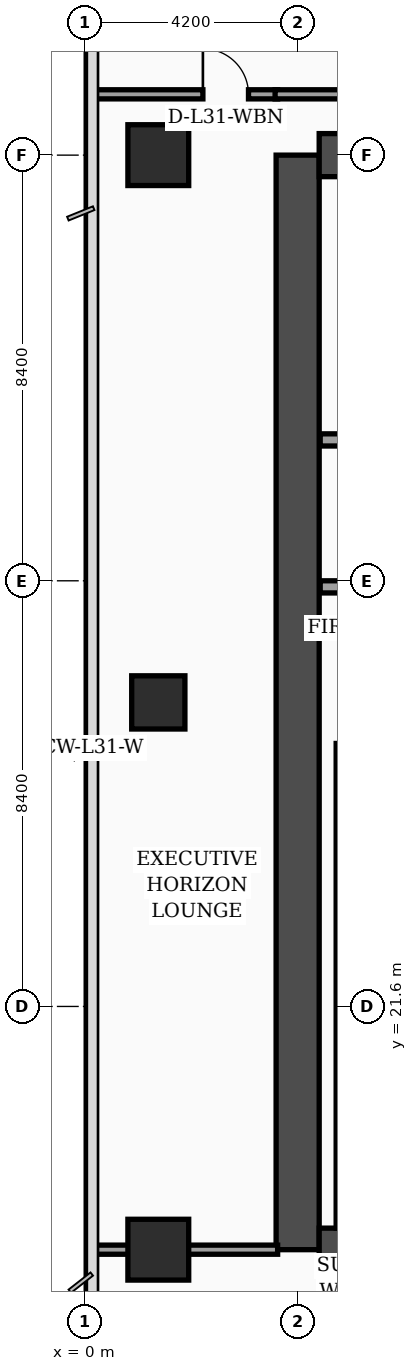
"""IFC4 building model, lengths in metres.
Left out: names, types, materials, properties, quantities, classifications, styles, units other than length and angle.
Written with IfcOpenShell. Run it as: python <this file> out.ifc"""

import sys

from ifc_helpers import new_model, si_unit, direction, frame, frame_2d, origin, origin_2d, place, context, subcontext, project, spatial, rectangle, extrude, element, fill, save


model = new_model("IFC4")
c1 = context("Model", 3, precision=1e-05, world=origin(), true_north=direction((0.0, 1.0)))
c2 = subcontext(c1, "Body", "Model", "MODEL_VIEW")
j1 = project(units=[si_unit("LENGTHUNIT", "METRE"), si_unit("PLANEANGLEUNIT", "RADIAN")], contexts=[c1])
p1 = place(None, origin())
s1 = spatial("IfcSite", under=j1, at=p1, CompositionType="ELEMENT")
p2 = place(p1, origin())
s2 = spatial("IfcBuilding", under=s1, at=p2, CompositionType="ELEMENT")
p3 = place(p2, frame((0.0, 0.0, 127.8)))
s3 = spatial("IfcBuildingStorey", under=s2, at=p3, CompositionType="ELEMENT", Elevation=127.8)
p4 = place(p3, frame((4.2, 16.8, 0.0), z_axis=(0.0, 0.0, 1.0), x_axis=(0.0, 1.0, 0.0)))
e1 = element("IfcWall", 1, at=p4, inside=s3, PredefinedType="SHEAR", context=c2, shape_type="SweptSolid", body=[
    extrude(rectangle(XDim=21.6, YDim=0.85, at=frame_2d((10.8, 0.0))), origin(), (0.0, 0.0, 1.0), 3.56),
])
for number, where, z_axis, x_axis in (
    (2, (4.625, 38.4, 0.0), (0.0, 0.0, 1.0), (1.0, 0.0, 0.0)),
    (3, (4.625, 16.8, 0.0), (0.0, 0.0, 1.0), (1.0, 0.0, 0.0)),
):
    element("IfcWall", number, at=place(p3, frame(where, z_axis=z_axis, x_axis=x_axis)), inside=s3, PredefinedType="SHEAR", context=c2, shape_type="SweptSolid", body=[
        extrude(rectangle(XDim=9.95, YDim=0.85, at=frame_2d((4.975, 0.0))), origin(), (0.0, 0.0, 1.0), 3.56),
    ])
p5 = place(p3, frame((5.08, 17.225, 0.0), z_axis=(0.0, 0.0, 1.0), x_axis=(0.0, 1.0, 0.0)))
e4 = element("IfcWall", 4, at=p5, inside=s3, PredefinedType="SOLIDWALL", context=c2, shape_type="SweptSolid", body=[
    extrude(rectangle(XDim=9.565, YDim=0.24, at=frame_2d((4.782, 0.0))), origin(), (0.0, 0.0, 1.0), 3.56),
])
p6 = place(p3, frame((1.45, 16.8, 0.0), z_axis=(0.0, 0.0, 1.0), x_axis=(1.0, 0.0, 0.0)))
e5 = element("IfcColumn", 5, at=p6, inside=s3, PredefinedType="COLUMN", context=c2, shape_type="SweptSolid", body=[
    extrude(rectangle(XDim=1.2, YDim=1.2, at=origin_2d()), origin(), (0.0, 0.0, 1.0), 3.56),
])
p7 = place(p3, frame((1.45, 27.6, 0.0), z_axis=(0.0, 0.0, 1.0), x_axis=(1.0, 0.0, 0.0)))
e6 = element("IfcColumn", 6, at=p7, inside=s3, PredefinedType="COLUMN", context=c2, shape_type="SweptSolid", body=[
    extrude(rectangle(XDim=1.05, YDim=1.05, at=origin_2d()), origin(), (0.0, 0.0, 1.0), 3.56),
])
p8 = place(p3, frame((1.45, 38.4, 0.0), z_axis=(0.0, 0.0, 1.0), x_axis=(1.0, 0.0, 0.0)))
e7 = element("IfcColumn", 7, at=p8, inside=s3, PredefinedType="COLUMN", context=c2, shape_type="SweptSolid", body=[
    extrude(rectangle(XDim=1.2, YDim=1.2, at=origin_2d()), origin(), (0.0, 0.0, 1.0), 3.56),
])
p9 = place(p3, frame((4.645, 29.88, 0.0), z_axis=(0.0, 0.0, 1.0), x_axis=(1.0, 0.0, 0.0)))
e8 = element("IfcWall", 8, at=p9, inside=s3, PredefinedType="SOLIDWALL", context=c2, shape_type="SweptSolid", body=[
    extrude(rectangle(XDim=4.775, YDim=0.24, at=frame_2d((2.387, 0.0))), origin(), (0.0, 0.0, 1.0), 3.56),
])
p10 = place(p9, frame((0.45, 0.0, 0.0)))
e9 = element("IfcOpeningElement", 9, at=p10, cuts=e8, PredefinedType="OPENING", context=c2, shape_type="SweptSolid", body=[
    extrude(rectangle(XDim=1.3, YDim=2.35, at=frame_2d((0.65, 1.175))), frame((0.0, 0.13, 0.0), z_axis=(0.0, -1.0, 0.0), x_axis=(1.0, 0.0, 0.0)), (0.0, 0.0, 1.0), 0.26),
])
p11 = place(p3, frame((4.645, 32.78, 0.0), z_axis=(0.0, 0.0, 1.0), x_axis=(1.0, 0.0, 0.0)))
e10 = element("IfcWall", 10, at=p11, inside=s3, PredefinedType="SOLIDWALL", context=c2, shape_type="SweptSolid", body=[
    extrude(rectangle(XDim=4.775, YDim=0.24, at=frame_2d((2.387, 0.0))), origin(), (0.0, 0.0, 1.0), 3.19),
])
p12 = place(p3, frame((0.08, 16.8, 0.0), z_axis=(0.0, 0.0, 1.0), x_axis=(1.0, 0.0, 0.0)))
e11 = element("IfcWall", 11, at=p12, inside=s3, PredefinedType="PARTITIONING", context=c2, shape_type="SweptSolid", body=[
    extrude(rectangle(XDim=3.725, YDim=0.18, at=frame_2d((1.862, 0.0))), origin(), (0.0, 0.0, 1.0), 2.84),
])
p13 = place(p3, frame((0.08, 39.6, 0.0), z_axis=(0.0, 0.0, 1.0), x_axis=(1.0, 0.0, 0.0)))
e12 = element("IfcWall", 12, at=p13, inside=s3, PredefinedType="PARTITIONING", context=c2, shape_type="SweptSolid", body=[
    extrude(rectangle(XDim=3.725, YDim=0.18, at=frame_2d((1.862, 0.0))), origin(), (0.0, 0.0, 1.0), 2.84),
])
p14 = place(p13, frame((2.25, 0.0, 0.0)))
e13 = element("IfcOpeningElement", 13, at=p14, cuts=e12, PredefinedType="OPENING", context=c2, shape_type="SweptSolid", body=[
    extrude(rectangle(XDim=0.9, YDim=2.15, at=frame_2d((0.45, 1.075))), frame((0.0, 0.1, 0.0), z_axis=(0.0, -1.0, 0.0), x_axis=(1.0, 0.0, 0.0)), (0.0, 0.0, 1.0), 0.2),
])
p15 = place(p3, frame((3.755, 39.6, 0.0), z_axis=(0.0, 0.0, 1.0), x_axis=(1.0, 0.0, 0.0)))
e14 = element("IfcWall", 14, at=p15, inside=s3, PredefinedType="PARTITIONING", context=c2, shape_type="SweptSolid", body=[
    extrude(rectangle(XDim=11.395, YDim=0.18, at=frame_2d((5.698, 0.0))), origin(), (0.0, 0.0, 1.0), 2.84),
])
p16 = place(p14, origin())
e15 = element("IfcDoor", 15, at=p16, inside=s3, OperationType="SINGLE_SWING_LEFT", PredefinedType="DOOR", context=c2, shape_type="SweptSolid", body=[
    extrude(rectangle(XDim=0.9, YDim=2.15, at=frame_2d((0.45, 1.075))), frame((0.0, 0.025, 0.0), z_axis=(0.0, -1.0, 0.0), x_axis=(1.0, 0.0, 0.0)), (0.0, 0.0, 1.0), 0.05),
])
fill(e13, e15)
save(model, sys.argv[1])
